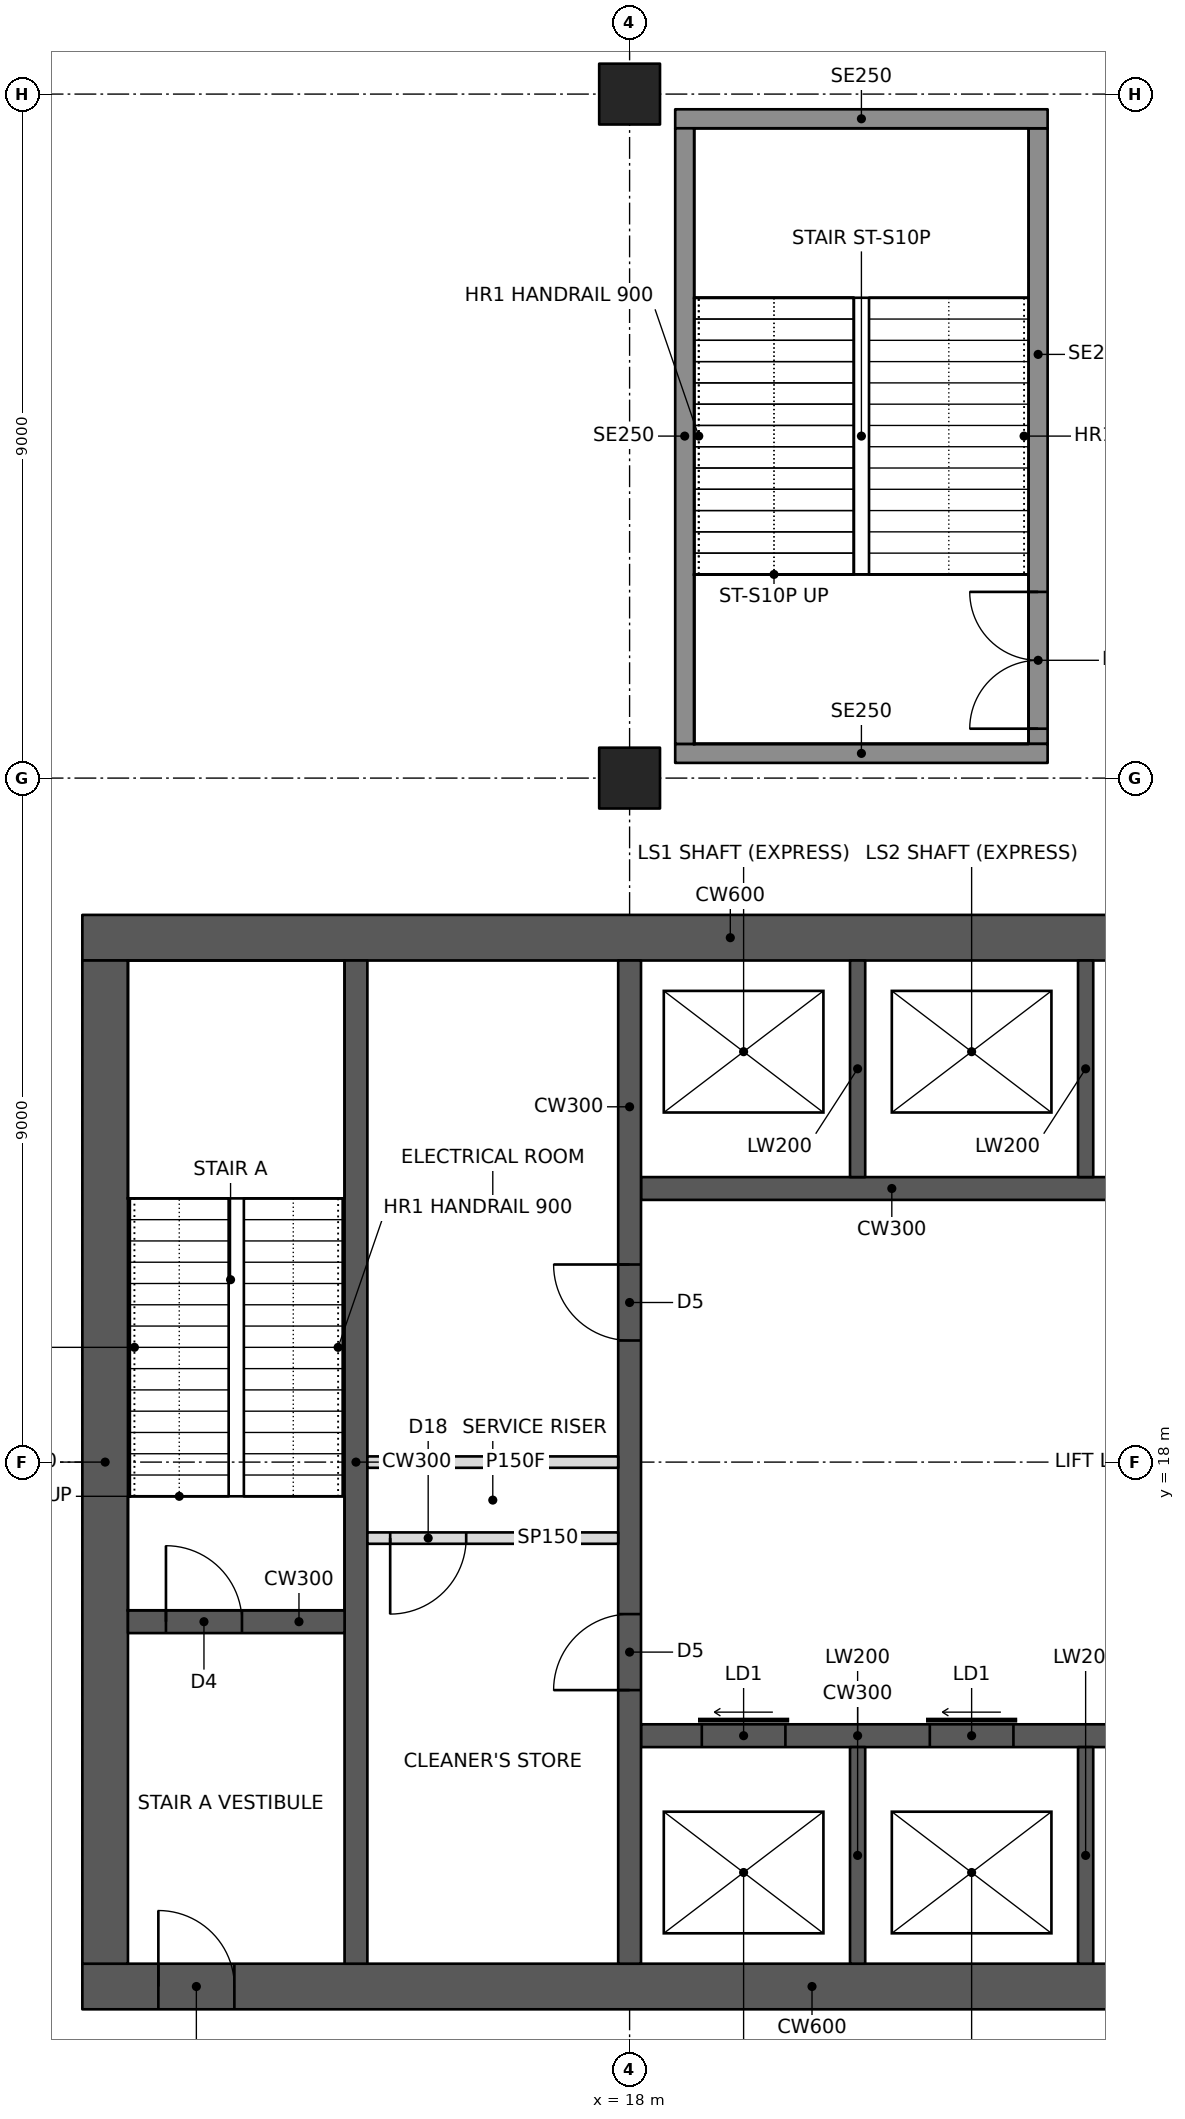
"""IFC4 building model, lengths in metres.
Left out: names, types, materials, properties, quantities, classifications, styles, units other than length and angle.
Written with IfcOpenShell. Run it as: python <this file> out.ifc"""

import sys

from ifc_helpers import new_model, si_unit, direction, frame, frame_2d, origin, origin_2d, place, context, subcontext, project, spatial, rectangle, hollow_rectangle, extrude, element, fill, save


model = new_model("IFC4")
c1 = context("Model", 3, precision=1e-05, world=origin(), true_north=direction((0.0, 1.0)))
c2 = subcontext(c1, "Body", "Model", "MODEL_VIEW")
j1 = project(units=[si_unit("LENGTHUNIT", "METRE"), si_unit("PLANEANGLEUNIT", "RADIAN")], contexts=[c1])
p1 = place(None, origin())
s1 = spatial("IfcSite", under=j1, at=p1, CompositionType="ELEMENT")
p2 = place(p1, origin())
s2 = spatial("IfcBuilding", under=s1, at=p2, CompositionType="ELEMENT")
p3 = place(p2, frame((0.0, 0.0, 11.0)))
s3 = spatial("IfcBuildingStorey", under=s2, at=p3, CompositionType="ELEMENT", Elevation=11.0)
for number, where, z_axis, x_axis in (
    (1, (18.0, 27.0, 0.0), (0.0, 0.0, 1.0), (1.0, 0.0, 0.0)),
    (2, (18.0, 36.0, 0.0), (0.0, 0.0, 1.0), (1.0, 0.0, 0.0)),
):
    element("IfcColumn", number, at=place(p3, frame(where, z_axis=z_axis, x_axis=x_axis)), inside=s3, PredefinedType="COLUMN", context=c2, shape_type="SweptSolid", body=[
        extrude(hollow_rectangle(XDim=0.8, YDim=0.8, WallThickness=0.1, at=origin_2d()), origin(), (0.0, 0.0, 1.0), 5.0),
    ])
p4 = place(p3, frame((10.8, 11.1, 0.0), z_axis=(0.0, 0.0, 1.0), x_axis=(1.0, 0.0, 0.0)))
e3 = element("IfcWall", 3, at=p4, inside=s3, PredefinedType="SHEAR", context=c2, shape_type="SweptSolid", body=[
    extrude(rectangle(XDim=23.4, YDim=0.6, at=frame_2d((11.7, 0.0))), origin(), (0.0, 0.0, 1.0), 5.0),
])
p5 = place(p4, frame((1.0, 0.0, 0.0)))
e4 = element("IfcOpeningElement", 4, at=p5, cuts=e3, PredefinedType="OPENING", context=c2, shape_type="SweptSolid", body=[
    extrude(rectangle(XDim=1.0, YDim=2.1, at=frame_2d((0.5, 1.05))), frame((0.0, 0.31, 0.0), z_axis=(0.0, -1.0, 0.0), x_axis=(1.0, 0.0, 0.0)), (0.0, 0.0, 1.0), 0.62),
])
p6 = place(p4, frame((17.2, 0.0, 0.0)))
e5 = element("IfcOpeningElement", 5, at=p6, cuts=e3, PredefinedType="OPENING", context=c2, shape_type="SweptSolid", body=[
    extrude(rectangle(XDim=1.8, YDim=2.1, at=frame_2d((0.9, 1.05))), frame((0.0, 0.31, 0.0), z_axis=(0.0, -1.0, 0.0), x_axis=(1.0, 0.0, 0.0)), (0.0, 0.0, 1.0), 0.62),
])
p7 = place(p3, frame((10.8, 24.9, 0.0), z_axis=(0.0, 0.0, 1.0), x_axis=(1.0, 0.0, 0.0)))
e6 = element("IfcWall", 6, at=p7, inside=s3, PredefinedType="SHEAR", context=c2, shape_type="SweptSolid", body=[
    extrude(rectangle(XDim=23.4, YDim=0.6, at=frame_2d((11.7, 0.0))), origin(), (0.0, 0.0, 1.0), 5.0),
])
p8 = place(p7, frame((17.2, 0.0, 0.0)))
e7 = element("IfcOpeningElement", 7, at=p8, cuts=e6, PredefinedType="OPENING", context=c2, shape_type="SweptSolid", body=[
    extrude(rectangle(XDim=1.8, YDim=2.1, at=frame_2d((0.9, 1.05))), frame((0.0, 0.31, 0.0), z_axis=(0.0, -1.0, 0.0), x_axis=(1.0, 0.0, 0.0)), (0.0, 0.0, 1.0), 0.62),
])
p9 = place(p7, frame((21.1, 0.0, 0.0)))
e8 = element("IfcOpeningElement", 8, at=p9, cuts=e6, PredefinedType="OPENING", context=c2, shape_type="SweptSolid", body=[
    extrude(rectangle(XDim=1.0, YDim=2.1, at=frame_2d((0.5, 1.05))), frame((0.0, 0.31, 0.0), z_axis=(0.0, -1.0, 0.0), x_axis=(1.0, 0.0, 0.0)), (0.0, 0.0, 1.0), 0.62),
])
p10 = place(p3, frame((11.1, 11.4, 0.0), z_axis=(0.0, 0.0, 1.0), x_axis=(0.0, 1.0, 0.0)))
e9 = element("IfcWall", 9, at=p10, inside=s3, PredefinedType="SHEAR", context=c2, shape_type="SweptSolid", body=[
    extrude(rectangle(XDim=13.2, YDim=0.6, at=frame_2d((6.6, 0.0))), origin(), (0.0, 0.0, 1.0), 5.0),
])
p11 = place(p3, frame((14.4, 11.4, 0.0), z_axis=(0.0, 0.0, 1.0), x_axis=(0.0, 1.0, 0.0)))
e10 = element("IfcWall", 10, at=p11, inside=s3, PredefinedType="SHEAR", context=c2, shape_type="SweptSolid", body=[
    extrude(rectangle(XDim=13.2, YDim=0.3, at=frame_2d((6.6, 0.0))), origin(), (0.0, 0.0, 1.0), 5.0),
])
p12 = place(p3, frame((11.4, 15.9, 0.0), z_axis=(0.0, 0.0, 1.0), x_axis=(1.0, 0.0, 0.0)))
e11 = element("IfcWall", 11, at=p12, inside=s3, PredefinedType="SHEAR", context=c2, shape_type="SweptSolid", body=[
    extrude(rectangle(XDim=2.85, YDim=0.3, at=frame_2d((1.425, 0.0))), origin(), (0.0, 0.0, 1.0), 5.0),
])
p13 = place(p12, frame((0.5, 0.0, 0.0)))
e12 = element("IfcOpeningElement", 12, at=p13, cuts=e11, PredefinedType="OPENING", context=c2, shape_type="SweptSolid", body=[
    extrude(rectangle(XDim=1.0, YDim=2.1, at=frame_2d((0.5, 1.05))), frame((0.0, 0.16, 0.0), z_axis=(0.0, -1.0, 0.0), x_axis=(1.0, 0.0, 0.0)), (0.0, 0.0, 1.0), 0.32),
])
p14 = place(p3, frame((18.0, 11.4, 0.0), z_axis=(0.0, 0.0, 1.0), x_axis=(0.0, 1.0, 0.0)))
e13 = element("IfcWall", 13, at=p14, inside=s3, PredefinedType="SHEAR", context=c2, shape_type="SweptSolid", body=[
    extrude(rectangle(XDim=13.2, YDim=0.3, at=frame_2d((6.6, 0.0))), origin(), (0.0, 0.0, 1.0), 5.0),
])
p15 = place(p14, frame((3.6, 0.0, 0.0)))
e14 = element("IfcOpeningElement", 14, at=p15, cuts=e13, PredefinedType="OPENING", context=c2, shape_type="SweptSolid", body=[
    extrude(rectangle(XDim=1.0, YDim=2.1, at=frame_2d((0.5, 1.05))), frame((0.0, 0.16, 0.0), z_axis=(0.0, -1.0, 0.0), x_axis=(1.0, 0.0, 0.0)), (0.0, 0.0, 1.0), 0.32),
])
p16 = place(p14, frame((8.2, 0.0, 0.0)))
e15 = element("IfcOpeningElement", 15, at=p16, cuts=e13, PredefinedType="OPENING", context=c2, shape_type="SweptSolid", body=[
    extrude(rectangle(XDim=1.0, YDim=2.1, at=frame_2d((0.5, 1.05))), frame((0.0, 0.16, 0.0), z_axis=(0.0, -1.0, 0.0), x_axis=(1.0, 0.0, 0.0)), (0.0, 0.0, 1.0), 0.32),
])
p17 = place(p3, frame((14.55, 18.0, 0.0), z_axis=(0.0, 0.0, 1.0), x_axis=(1.0, 0.0, 0.0)))
e16 = element("IfcWall", 16, at=p17, inside=s3, PredefinedType="PARTITIONING", context=c2, shape_type="SweptSolid", body=[
    extrude(rectangle(XDim=3.3, YDim=0.15, at=frame_2d((1.65, 0.0))), origin(), (0.0, 0.0, 1.0), 4.75),
])
p18 = place(p3, frame((18.15, 14.4, 0.0), z_axis=(0.0, 0.0, 1.0), x_axis=(1.0, 0.0, 0.0)))
e17 = element("IfcWall", 17, at=p18, inside=s3, PredefinedType="SHEAR", context=c2, shape_type="SweptSolid", body=[
    extrude(rectangle(XDim=9.0, YDim=0.3, at=frame_2d((4.5, 0.0))), origin(), (0.0, 0.0, 1.0), 5.0),
])
p19 = place(p18, frame((0.8, 0.0, 0.0)))
e18 = element("IfcOpeningElement", 18, at=p19, cuts=e17, PredefinedType="OPENING", context=c2, shape_type="SweptSolid", body=[
    extrude(rectangle(XDim=1.1, YDim=2.1, at=frame_2d((0.55, 1.05))), frame((0.0, 0.16, 0.0), z_axis=(0.0, -1.0, 0.0), x_axis=(1.0, 0.0, 0.0)), (0.0, 0.0, 1.0), 0.32),
])
p20 = place(p18, frame((3.8, 0.0, 0.0)))
e19 = element("IfcOpeningElement", 19, at=p20, cuts=e17, PredefinedType="OPENING", context=c2, shape_type="SweptSolid", body=[
    extrude(rectangle(XDim=1.1, YDim=2.1, at=frame_2d((0.55, 1.05))), frame((0.0, 0.16, 0.0), z_axis=(0.0, -1.0, 0.0), x_axis=(1.0, 0.0, 0.0)), (0.0, 0.0, 1.0), 0.32),
])
p21 = place(p18, frame((6.75, 0.0, 0.0)))
e20 = element("IfcOpeningElement", 20, at=p21, cuts=e17, PredefinedType="OPENING", context=c2, shape_type="SweptSolid", body=[
    extrude(rectangle(XDim=1.2, YDim=2.1, at=frame_2d((0.6, 1.05))), frame((0.0, 0.16, 0.0), z_axis=(0.0, -1.0, 0.0), x_axis=(1.0, 0.0, 0.0)), (0.0, 0.0, 1.0), 0.32),
])
for number, where, z_axis, x_axis in (
    (21, (21.0, 11.4, 0.0), (0.0, 0.0, 1.0), (0.0, 1.0, 0.0)),
    (22, (24.0, 11.4, 0.0), (0.0, 0.0, 1.0), (0.0, 1.0, 0.0)),
):
    element("IfcWall", number, at=place(p3, frame(where, z_axis=z_axis, x_axis=x_axis)), inside=s3, PredefinedType="SHEAR", context=c2, shape_type="SweptSolid", body=[
        extrude(rectangle(XDim=2.85, YDim=0.2, at=frame_2d((1.425, 0.0))), origin(), (0.0, 0.0, 1.0), 5.0),
    ])
p22 = place(p3, frame((18.15, 21.6, 0.0), z_axis=(0.0, 0.0, 1.0), x_axis=(1.0, 0.0, 0.0)))
e23 = element("IfcWall", 23, at=p22, inside=s3, PredefinedType="SHEAR", context=c2, shape_type="SweptSolid", body=[
    extrude(rectangle(XDim=9.0, YDim=0.3, at=frame_2d((4.5, 0.0))), origin(), (0.0, 0.0, 1.0), 5.0),
])
p23 = place(p22, frame((6.75, 0.0, 0.0)))
e24 = element("IfcOpeningElement", 24, at=p23, cuts=e23, PredefinedType="OPENING", context=c2, shape_type="SweptSolid", body=[
    extrude(rectangle(XDim=1.2, YDim=2.1, at=frame_2d((0.6, 1.05))), frame((0.0, 0.16, 0.0), z_axis=(0.0, -1.0, 0.0), x_axis=(1.0, 0.0, 0.0)), (0.0, 0.0, 1.0), 0.32),
])
for number, where, z_axis, x_axis in (
    (25, (21.0, 21.75, 0.0), (0.0, 0.0, 1.0), (0.0, 1.0, 0.0)),
    (26, (24.0, 21.75, 0.0), (0.0, 0.0, 1.0), (0.0, 1.0, 0.0)),
):
    element("IfcWall", number, at=place(p3, frame(where, z_axis=z_axis, x_axis=x_axis)), inside=s3, PredefinedType="SHEAR", context=c2, shape_type="SweptSolid", body=[
        extrude(rectangle(XDim=2.85, YDim=0.2, at=frame_2d((1.425, 0.0))), origin(), (0.0, 0.0, 1.0), 5.0),
    ])
p24 = place(p3, frame((14.55, 17.0, 0.0), z_axis=(0.0, 0.0, 1.0), x_axis=(1.0, 0.0, 0.0)))
e27 = element("IfcWall", 27, at=p24, inside=s3, PredefinedType="PARTITIONING", context=c2, shape_type="SweptSolid", body=[
    extrude(rectangle(XDim=3.3, YDim=0.15, at=frame_2d((1.65, 0.0))), origin(), (0.0, 0.0, 1.0), 4.75),
])
p25 = place(p24, frame((0.3, 0.0, 0.0)))
e28 = element("IfcOpeningElement", 28, at=p25, cuts=e27, PredefinedType="OPENING", context=c2, shape_type="SweptSolid", body=[
    extrude(rectangle(XDim=1.0, YDim=2.1, at=frame_2d((0.5, 1.05))), frame((0.0, 0.085, 0.0), z_axis=(0.0, -1.0, 0.0), x_axis=(1.0, 0.0, 0.0)), (0.0, 0.0, 1.0), 0.17),
])
for number, where, z_axis, x_axis in (
    (29, (18.6, 27.325, 0.0), (0.0, 0.0, 1.0), (1.0, 0.0, 0.0)),
    (30, (18.6, 35.675, 0.0), (0.0, 0.0, 1.0), (1.0, 0.0, 0.0)),
):
    element("IfcWall", number, at=place(p3, frame(where, z_axis=z_axis, x_axis=x_axis)), inside=s3, PredefinedType="SOLIDWALL", context=c2, shape_type="SweptSolid", body=[
        extrude(rectangle(XDim=4.9, YDim=0.25, at=frame_2d((2.45, 0.0))), origin(), (0.0, 0.0, 1.0), 4.75),
    ])
p26 = place(p3, frame((18.725, 27.45, 0.0), z_axis=(0.0, 0.0, 1.0), x_axis=(0.0, 1.0, 0.0)))
e31 = element("IfcWall", 31, at=p26, inside=s3, PredefinedType="SOLIDWALL", context=c2, shape_type="SweptSolid", body=[
    extrude(rectangle(XDim=8.1, YDim=0.25, at=frame_2d((4.05, 0.0))), origin(), (0.0, 0.0, 1.0), 4.75),
])
p27 = place(p3, frame((23.375, 27.45, 0.0), z_axis=(0.0, 0.0, 1.0), x_axis=(0.0, 1.0, 0.0)))
e32 = element("IfcWall", 32, at=p27, inside=s3, PredefinedType="SOLIDWALL", context=c2, shape_type="SweptSolid", body=[
    extrude(rectangle(XDim=8.1, YDim=0.25, at=frame_2d((4.05, 0.0))), origin(), (0.0, 0.0, 1.0), 4.75),
])
p28 = place(p27, frame((0.2, 0.0, 0.0)))
e33 = element("IfcOpeningElement", 33, at=p28, cuts=e32, PredefinedType="OPENING", context=c2, shape_type="SweptSolid", body=[
    extrude(rectangle(XDim=1.8, YDim=2.1, at=frame_2d((0.9, 1.05))), frame((0.0, 0.135, 0.0), z_axis=(0.0, -1.0, 0.0), x_axis=(1.0, 0.0, 0.0)), (0.0, 0.0, 1.0), 0.27),
])
p29 = place(p25, frame((1.0, 0.0, 0.0), z_axis=(0.0, 0.0, 1.0), x_axis=(-1.0, 0.0, 0.0)))
e34 = element("IfcDoor", 34, at=p29, inside=s3, OperationType="SINGLE_SWING_RIGHT", PredefinedType="DOOR", context=c2, shape_type="SweptSolid", body=[
    extrude(rectangle(XDim=1.0, YDim=2.1, at=frame_2d((0.5, 1.05))), frame((0.0, 0.025, 0.0), z_axis=(0.0, -1.0, 0.0), x_axis=(1.0, 0.0, 0.0)), (0.0, 0.0, 1.0), 0.05),
])
fill(e28, e34)
p30 = place(p5, origin())
e35 = element("IfcDoor", 35, at=p30, inside=s3, OperationType="SINGLE_SWING_LEFT", PredefinedType="DOOR", context=c2, shape_type="SweptSolid", body=[
    extrude(rectangle(XDim=1.0, YDim=2.1, at=frame_2d((0.5, 1.05))), frame((0.0, 0.025, 0.0), z_axis=(0.0, -1.0, 0.0), x_axis=(1.0, 0.0, 0.0)), (0.0, 0.0, 1.0), 0.05),
])
fill(e4, e35)
p31 = place(p13, origin())
e36 = element("IfcDoor", 36, at=p31, inside=s3, OperationType="SINGLE_SWING_LEFT", PredefinedType="DOOR", context=c2, shape_type="SweptSolid", body=[
    extrude(rectangle(XDim=1.0, YDim=2.1, at=frame_2d((0.5, 1.05))), frame((0.0, 0.025, 0.0), z_axis=(0.0, -1.0, 0.0), x_axis=(1.0, 0.0, 0.0)), (0.0, 0.0, 1.0), 0.05),
])
fill(e12, e36)
p32 = place(p15, origin())
e37 = element("IfcDoor", 37, at=p32, inside=s3, OperationType="SINGLE_SWING_LEFT", PredefinedType="DOOR", context=c2, shape_type="SweptSolid", body=[
    extrude(rectangle(XDim=1.0, YDim=2.1, at=frame_2d((0.5, 1.05))), frame((0.0, 0.025, 0.0), z_axis=(0.0, -1.0, 0.0), x_axis=(1.0, 0.0, 0.0)), (0.0, 0.0, 1.0), 0.05),
])
fill(e14, e37)
p33 = place(p16, origin())
e38 = element("IfcDoor", 38, at=p33, inside=s3, OperationType="SINGLE_SWING_RIGHT", PredefinedType="DOOR", context=c2, shape_type="SweptSolid", body=[
    extrude(rectangle(XDim=1.0, YDim=2.1, at=frame_2d((0.5, 1.05))), frame((0.0, 0.025, 0.0), z_axis=(0.0, -1.0, 0.0), x_axis=(1.0, 0.0, 0.0)), (0.0, 0.0, 1.0), 0.05),
])
fill(e15, e38)
p34 = place(p19, origin())
e39 = element("IfcDoor", 39, at=p34, inside=s3, OperationType="SLIDING_TO_LEFT", PredefinedType="DOOR", context=c2, shape_type="SweptSolid", body=[
    extrude(rectangle(XDim=1.1, YDim=2.1, at=frame_2d((0.55, 1.05))), frame((0.0, 0.025, 0.0), z_axis=(0.0, -1.0, 0.0), x_axis=(1.0, 0.0, 0.0)), (0.0, 0.0, 1.0), 0.05),
])
fill(e18, e39)
p35 = place(p20, origin())
e40 = element("IfcDoor", 40, at=p35, inside=s3, OperationType="SLIDING_TO_LEFT", PredefinedType="DOOR", context=c2, shape_type="SweptSolid", body=[
    extrude(rectangle(XDim=1.1, YDim=2.1, at=frame_2d((0.55, 1.05))), frame((0.0, 0.025, 0.0), z_axis=(0.0, -1.0, 0.0), x_axis=(1.0, 0.0, 0.0)), (0.0, 0.0, 1.0), 0.05),
])
fill(e19, e40)
p36 = place(p28, origin())
e41 = element("IfcDoor", 41, at=p36, inside=s3, OperationType="DOUBLE_DOOR_SINGLE_SWING", PredefinedType="DOOR", context=c2, shape_type="SweptSolid", body=[
    extrude(rectangle(XDim=1.8, YDim=2.1, at=frame_2d((0.9, 1.05))), frame((0.0, 0.025, 0.0), z_axis=(0.0, -1.0, 0.0), x_axis=(1.0, 0.0, 0.0)), (0.0, 0.0, 1.0), 0.05),
])
fill(e33, e41)
save(model, sys.argv[1])
